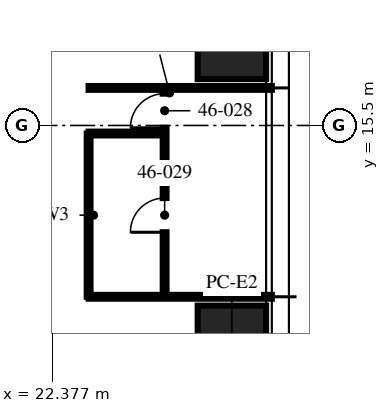
"""IFC4 building model, lengths in metres.
Left out: names, types, materials, properties, quantities, classifications, styles, units other than length and angle.
Written with IfcOpenShell. Run it as: python <this file> out.ifc"""

import sys

from ifc_helpers import new_model, si_unit, direction, frame, frame_2d, origin, origin_2d, place, context, subcontext, project, spatial, rectangle, hollow_rectangle, extrude, element, fill, save


model = new_model("IFC4")
c1 = context("Model", 3, precision=1e-05, world=origin(), true_north=direction((0.0, 1.0)))
c2 = subcontext(c1, "Body", "Model", "MODEL_VIEW")
j1 = project(units=[si_unit("LENGTHUNIT", "METRE"), si_unit("PLANEANGLEUNIT", "RADIAN")], contexts=[c1])
p1 = place(None, origin())
s1 = spatial("IfcSite", under=j1, at=p1, CompositionType="ELEMENT")
p2 = place(p1, origin())
s2 = spatial("IfcBuilding", under=s1, at=p2, CompositionType="ELEMENT")
p3 = place(p2, frame((0.0, 0.0, 182.25)))
s3 = spatial("IfcBuildingStorey", under=s2, at=p3, CompositionType="ELEMENT", Elevation=182.25)
for number, where, z_axis, x_axis in (
    (1, (27.1, 18.32, 0.0), (0.0, 0.0, 1.0), (0.0, 1.0, 0.0)),
    (2, (27.1, 9.16, 0.0), (0.0, 0.0, 1.0), (0.0, 1.0, 0.0)),
):
    element("IfcColumn", number, at=place(p3, frame(where, z_axis=z_axis, x_axis=x_axis)), inside=s3, PredefinedType="COLUMN", context=c2, shape_type="SweptSolid", body=[
        extrude(hollow_rectangle(XDim=3.2, YDim=1.8, WallThickness=0.2, at=origin_2d()), origin(), (0.0, 0.0, 1.0), 3.75),
    ])
for number, where, z_axis, x_axis in (
    (3, (23.33, 10.992, 0.0), (0.0, 0.0, 1.0), (1.0, 0.0, 0.0)),
    (4, (23.33, 16.488, 0.0), (0.0, 0.0, 1.0), (1.0, 0.0, 0.0)),
):
    element("IfcWall", number, at=place(p3, frame(where, z_axis=z_axis, x_axis=x_axis)), inside=s3, PredefinedType="PARTITIONING", context=c2, shape_type="SweptSolid", body=[
        extrude(rectangle(XDim=4.82, YDim=0.1, at=frame_2d((2.41, 0.0))), origin(), (0.0, 0.0, 1.0), 2.56),
    ])
p4 = place(p3, frame((25.33, 10.992, 0.0), z_axis=(0.0, 0.0, 1.0), x_axis=(0.0, 1.0, 0.0)))
e5 = element("IfcWall", 5, at=p4, inside=s3, PredefinedType="PARTITIONING", context=c2, shape_type="SweptSolid", body=[
    extrude(rectangle(XDim=5.496, YDim=0.1, at=frame_2d((2.748, 0.0))), origin(), (0.0, 0.0, 1.0), 2.56),
])
p5 = place(p4, frame((4.446, 0.0, 0.0)))
e6 = element("IfcOpeningElement", 6, at=p5, cuts=e5, PredefinedType="OPENING", context=c2, shape_type="SweptSolid", body=[
    extrude(rectangle(XDim=0.9, YDim=2.1, at=frame_2d((0.45, 1.05))), frame((0.0, 0.06, 0.0), z_axis=(0.0, -1.0, 0.0), x_axis=(1.0, 0.0, 0.0)), (0.0, 0.0, 1.0), 0.12),
])
p6 = place(p4, frame((1.698, 0.0, 0.0)))
e7 = element("IfcOpeningElement", 7, at=p6, cuts=e5, PredefinedType="OPENING", context=c2, shape_type="SweptSolid", body=[
    extrude(rectangle(XDim=0.9, YDim=2.1, at=frame_2d((0.45, 1.05))), frame((0.0, 0.06, 0.0), z_axis=(0.0, -1.0, 0.0), x_axis=(1.0, 0.0, 0.0)), (0.0, 0.0, 1.0), 0.12),
])
p7 = place(p3, frame((23.33, 15.288, 0.0), z_axis=(0.0, 0.0, 1.0), x_axis=(1.0, 0.0, 0.0)))
e8 = element("IfcWall", 8, at=p7, inside=s3, PredefinedType="PARTITIONING", context=c2, shape_type="SweptSolid", body=[
    extrude(rectangle(XDim=2.0, YDim=0.1, at=frame_2d((1.0, 0.0))), origin(), (0.0, 0.0, 1.0), 3.45),
])
p8 = place(p3, frame((23.33, 10.992, 0.0), z_axis=(0.0, 0.0, 1.0), x_axis=(0.0, 1.0, 0.0)))
e9 = element("IfcWall", 9, at=p8, inside=s3, PredefinedType="PARTITIONING", context=c2, shape_type="SweptSolid", body=[
    extrude(rectangle(XDim=4.296, YDim=0.1, at=frame_2d((2.148, 0.0))), origin(), (0.0, 0.0, 1.0), 2.56),
])
p9 = place(p5, origin())
e10 = element("IfcDoor", 10, at=p9, inside=s3, OperationType="SINGLE_SWING_LEFT", PredefinedType="DOOR", context=c2, shape_type="SweptSolid", body=[
    extrude(rectangle(XDim=0.9, YDim=2.1, at=frame_2d((0.45, 1.05))), frame((0.0, 0.025, 0.0), z_axis=(0.0, -1.0, 0.0), x_axis=(1.0, 0.0, 0.0)), (0.0, 0.0, 1.0), 0.05),
])
fill(e6, e10)
p10 = place(p6, origin())
e11 = element("IfcDoor", 11, at=p10, inside=s3, OperationType="SINGLE_SWING_LEFT", PredefinedType="DOOR", context=c2, shape_type="SweptSolid", body=[
    extrude(rectangle(XDim=0.9, YDim=2.1, at=frame_2d((0.45, 1.05))), frame((0.0, 0.025, 0.0), z_axis=(0.0, -1.0, 0.0), x_axis=(1.0, 0.0, 0.0)), (0.0, 0.0, 1.0), 0.05),
])
fill(e7, e11)
save(model, sys.argv[1])
